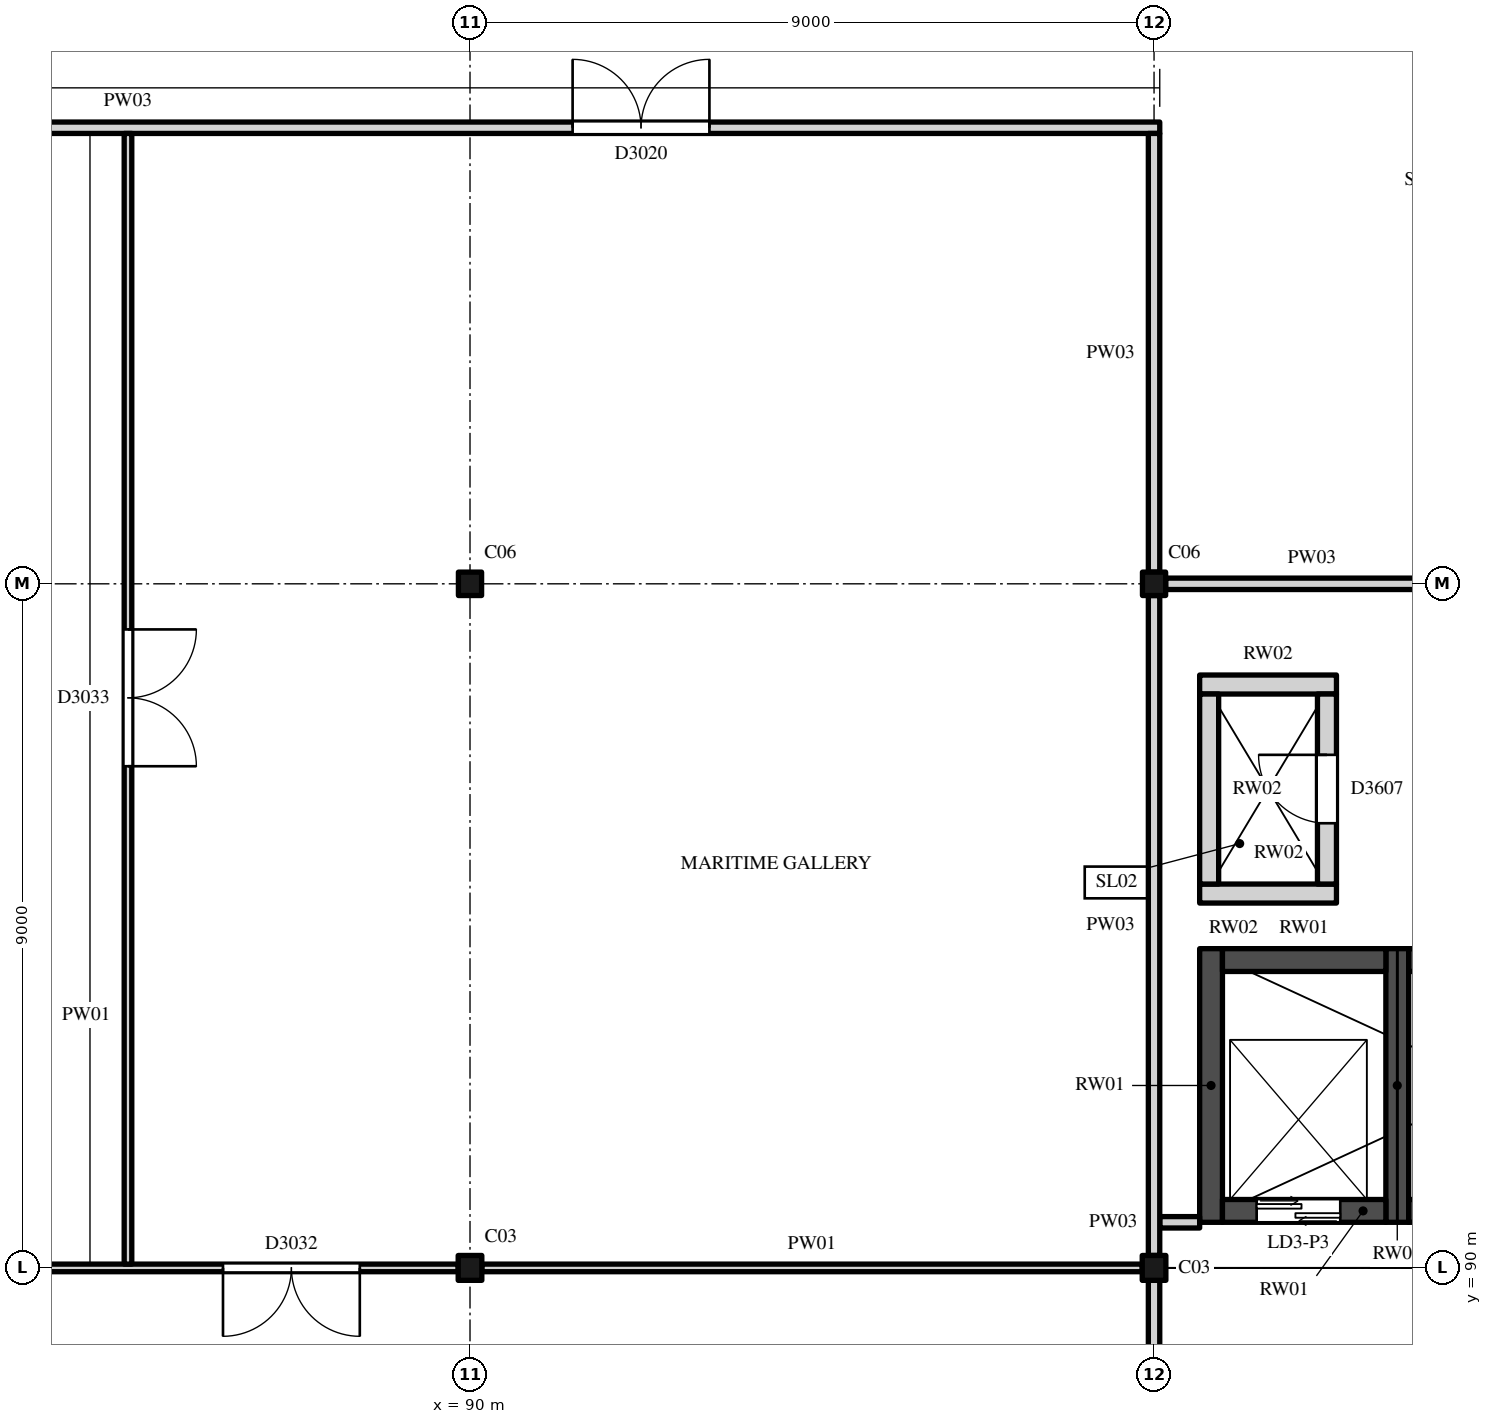
"""IFC4 building model, lengths in metres.
Left out: names, types, materials, properties, quantities, classifications, styles, units other than length and angle.
Written with IfcOpenShell. Run it as: python <this file> out.ifc"""

import sys

from ifc_helpers import new_model, si_unit, direction, frame, frame_2d, origin, origin_2d, place, context, subcontext, project, spatial, rectangle, i_section, extrude, element, fill, save


model = new_model("IFC4")
c1 = context("Model", 3, precision=1e-05, world=origin(), true_north=direction((0.0, 1.0)))
c2 = subcontext(c1, "Body", "Model", "MODEL_VIEW")
j1 = project(units=[si_unit("LENGTHUNIT", "METRE"), si_unit("PLANEANGLEUNIT", "RADIAN")], contexts=[c1])
p1 = place(None, origin())
s1 = spatial("IfcSite", under=j1, at=p1, CompositionType="ELEMENT")
p2 = place(p1, origin())
s2 = spatial("IfcBuilding", under=s1, at=p2, CompositionType="ELEMENT")
p3 = place(p2, frame((0.0, 0.0, 16.0)))
s3 = spatial("IfcBuildingStorey", under=s2, at=p3, CompositionType="ELEMENT", Elevation=16.0)
for number, where, z_axis, x_axis in (
    (1, (90.0, 90.0, 0.0), (0.0, 0.0, 1.0), (1.0, 0.0, 0.0)),
    (2, (99.0, 90.0, 0.0), (0.0, 0.0, 1.0), (1.0, 0.0, 0.0)),
):
    element("IfcColumn", number, at=place(p3, frame(where, z_axis=z_axis, x_axis=x_axis)), inside=s3, PredefinedType="COLUMN", context=c2, shape_type="SweptSolid", body=[
        extrude(i_section(OverallWidth=0.311, OverallDepth=0.327, WebThickness=0.016, FlangeThickness=0.025, FilletRadius=0.017, at=origin_2d()), origin(), (0.0, 0.0, 1.0), 10.0),
    ])
for number, where, z_axis, x_axis in (
    (3, (90.0, 99.0, 0.0), (0.0, 0.0, 1.0), (1.0, 0.0, 0.0)),
    (4, (99.0, 99.0, 0.0), (0.0, 0.0, 1.0), (1.0, 0.0, 0.0)),
):
    element("IfcColumn", number, at=place(p3, frame(where, z_axis=z_axis, x_axis=x_axis)), inside=s3, PredefinedType="COLUMN", context=c2, shape_type="SweptSolid", body=[
        extrude(i_section(OverallWidth=0.305, OverallDepth=0.308, WebThickness=0.01, FlangeThickness=0.015, FilletRadius=0.017, at=origin_2d()), origin(), (0.0, 0.0, 1.0), 10.0),
    ])
for number, where, z_axis, x_axis in (
    (5, (99.75, 90.6, 0.0), (0.0, 0.0, 1.0), (0.0, 1.0, 0.0)),
    (6, (102.2, 90.6, 0.0), (0.0, 0.0, 1.0), (0.0, 1.0, 0.0)),
):
    element("IfcWall", number, at=place(p3, frame(where, z_axis=z_axis, x_axis=x_axis)), inside=s3, PredefinedType="SHEAR", context=c2, shape_type="SweptSolid", body=[
        extrude(rectangle(XDim=3.6, YDim=0.3, at=frame_2d((1.8, 0.0))), origin(), (0.0, 0.0, 1.0), 10.0),
    ])
p4 = place(p3, frame((99.9, 90.75, 0.0), z_axis=(0.0, 0.0, 1.0), x_axis=(1.0, 0.0, 0.0)))
e7 = element("IfcWall", 7, at=p4, inside=s3, PredefinedType="SHEAR", context=c2, shape_type="SweptSolid", body=[
    extrude(rectangle(XDim=2.15, YDim=0.3, at=frame_2d((1.075, 0.0))), origin(), (0.0, 0.0, 1.0), 10.0),
])
p5 = place(p4, frame((0.45, 0.0, 0.0)))
e8 = element("IfcOpeningElement", 8, at=p5, cuts=e7, PredefinedType="OPENING", context=c2, shape_type="SweptSolid", body=[
    extrude(rectangle(XDim=1.1, YDim=2.1, at=frame_2d((0.55, 1.05))), frame((0.0, 0.16, 0.0), z_axis=(0.0, -1.0, 0.0), x_axis=(1.0, 0.0, 0.0)), (0.0, 0.0, 1.0), 0.32),
])
p6 = place(p3, frame((99.9, 94.05, 0.0), z_axis=(0.0, 0.0, 1.0), x_axis=(1.0, 0.0, 0.0)))
e9 = element("IfcWall", 9, at=p6, inside=s3, PredefinedType="SHEAR", context=c2, shape_type="SweptSolid", body=[
    extrude(rectangle(XDim=2.15, YDim=0.3, at=frame_2d((1.075, 0.0))), origin(), (0.0, 0.0, 1.0), 10.0),
])
p7 = place(p3, frame((102.35, 90.75, 0.0), z_axis=(0.0, 0.0, 1.0), x_axis=(1.0, 0.0, 0.0)))
e10 = element("IfcWall", 10, at=p7, inside=s3, PredefinedType="SHEAR", context=c2, shape_type="SweptSolid", body=[
    extrude(rectangle(XDim=2.3, YDim=0.3, at=frame_2d((1.15, 0.0))), origin(), (0.0, 0.0, 1.0), 10.0),
])
p8 = place(p7, frame((0.6, 0.0, 0.0)))
e11 = element("IfcOpeningElement", 11, at=p8, cuts=e10, PredefinedType="OPENING", context=c2, shape_type="SweptSolid", body=[
    extrude(rectangle(XDim=1.1, YDim=2.1, at=frame_2d((0.55, 1.05))), frame((0.0, 0.16, 0.0), z_axis=(0.0, -1.0, 0.0), x_axis=(1.0, 0.0, 0.0)), (0.0, 0.0, 1.0), 0.32),
])
p9 = place(p3, frame((102.35, 94.05, 0.0), z_axis=(0.0, 0.0, 1.0), x_axis=(1.0, 0.0, 0.0)))
e12 = element("IfcWall", 12, at=p9, inside=s3, PredefinedType="SHEAR", context=c2, shape_type="SweptSolid", body=[
    extrude(rectangle(XDim=2.3, YDim=0.3, at=frame_2d((1.15, 0.0))), origin(), (0.0, 0.0, 1.0), 10.0),
])
for number, where, z_axis, x_axis in (
    (13, (99.6, 94.925, 0.0), (0.0, 0.0, 1.0), (1.0, 0.0, 0.0)),
    (14, (99.6, 97.675, 0.0), (0.0, 0.0, 1.0), (1.0, 0.0, 0.0)),
):
    element("IfcWall", number, at=place(p3, frame(where, z_axis=z_axis, x_axis=x_axis)), inside=s3, PredefinedType="STANDARD", context=c2, shape_type="SweptSolid", body=[
        extrude(rectangle(XDim=1.8, YDim=0.25, at=frame_2d((0.9, 0.0))), origin(), (0.0, 0.0, 1.0), 10.0),
    ])
p10 = place(p3, frame((99.725, 95.05, 0.0), z_axis=(0.0, 0.0, 1.0), x_axis=(0.0, 1.0, 0.0)))
e15 = element("IfcWall", 15, at=p10, inside=s3, PredefinedType="STANDARD", context=c2, shape_type="SweptSolid", body=[
    extrude(rectangle(XDim=2.5, YDim=0.25, at=frame_2d((1.25, 0.0))), origin(), (0.0, 0.0, 1.0), 10.0),
])
p11 = place(p3, frame((101.275, 95.05, 0.0), z_axis=(0.0, 0.0, 1.0), x_axis=(0.0, 1.0, 0.0)))
e16 = element("IfcWall", 16, at=p11, inside=s3, PredefinedType="STANDARD", context=c2, shape_type="SweptSolid", body=[
    extrude(rectangle(XDim=2.5, YDim=0.25, at=frame_2d((1.25, 0.0))), origin(), (0.0, 0.0, 1.0), 10.0),
])
p12 = place(p11, frame((0.8, 0.0, 0.0)))
e17 = element("IfcOpeningElement", 17, at=p12, cuts=e16, PredefinedType="OPENING", context=c2, shape_type="SweptSolid", body=[
    extrude(rectangle(XDim=0.9, YDim=2.1, at=frame_2d((0.45, 1.05))), frame((0.0, 0.135, 0.0), z_axis=(0.0, -1.0, 0.0), x_axis=(1.0, 0.0, 0.0)), (0.0, 0.0, 1.0), 0.27),
])
p13 = place(p3, frame((81.156, 90.0, 0.0), z_axis=(0.0, 0.0, 1.0), x_axis=(1.0, 0.0, 0.0)))
e18 = element("IfcWall", 18, at=p13, inside=s3, PredefinedType="PARTITIONING", context=c2, shape_type="SweptSolid", body=[
    extrude(rectangle(XDim=8.689, YDim=0.1, at=frame_2d((4.344, 0.0))), origin(), (0.0, 0.0, 1.0), 9.473),
])
p14 = place(p13, frame((5.594, 0.0, 0.0)))
e19 = element("IfcOpeningElement", 19, at=p14, cuts=e18, PredefinedType="OPENING", context=c2, shape_type="SweptSolid", body=[
    extrude(rectangle(XDim=1.8, YDim=2.4, at=frame_2d((0.9, 1.2))), frame((0.0, 0.06, 0.0), z_axis=(0.0, -1.0, 0.0), x_axis=(1.0, 0.0, 0.0)), (0.0, 0.0, 1.0), 0.12),
])
p15 = place(p3, frame((90.156, 90.0, 0.0), z_axis=(0.0, 0.0, 1.0), x_axis=(1.0, 0.0, 0.0)))
e20 = element("IfcWall", 20, at=p15, inside=s3, PredefinedType="PARTITIONING", context=c2, shape_type="SweptSolid", body=[
    extrude(rectangle(XDim=8.689, YDim=0.1, at=frame_2d((4.344, 0.0))), origin(), (0.0, 0.0, 1.0), 9.473),
])
p16 = place(p3, frame((99.075, 90.6, 0.0), z_axis=(0.0, 0.0, 1.0), x_axis=(1.0, 0.0, 0.0)))
e21 = element("IfcWall", 21, at=p16, inside=s3, PredefinedType="PARTITIONING", context=c2, shape_type="SweptSolid", body=[
    extrude(rectangle(XDim=0.525, YDim=0.15, at=frame_2d((0.263, 0.0))), origin(), (0.0, 0.0, 1.0), 9.825),
])
p17 = place(p3, frame((99.153, 99.0, 0.0), z_axis=(0.0, 0.0, 1.0), x_axis=(1.0, 0.0, 0.0)))
e22 = element("IfcWall", 22, at=p17, inside=s3, PredefinedType="PARTITIONING", context=c2, shape_type="SweptSolid", body=[
    extrude(rectangle(XDim=8.695, YDim=0.15, at=frame_2d((4.347, 0.0))), origin(), (0.0, 0.0, 1.0), 9.473),
])
p18 = place(p17, frame((3.85, 0.0, 0.0)))
e23 = element("IfcOpeningElement", 23, at=p18, cuts=e22, PredefinedType="OPENING", context=c2, shape_type="SweptSolid", body=[
    extrude(rectangle(XDim=1.0, YDim=2.4, at=frame_2d((0.5, 1.2))), frame((0.0, 0.085, 0.0), z_axis=(0.0, -1.0, 0.0), x_axis=(1.0, 0.0, 0.0)), (0.0, 0.0, 1.0), 0.17),
])
p19 = place(p3, frame((71.925, 105.0, 0.0), z_axis=(0.0, 0.0, 1.0), x_axis=(1.0, 0.0, 0.0)))
e24 = element("IfcWall", 24, at=p19, inside=s3, PredefinedType="PARTITIONING", context=c2, shape_type="SweptSolid", body=[
    extrude(rectangle(XDim=27.15, YDim=0.15, at=frame_2d((13.575, 0.0))), origin(), (0.0, 0.0, 1.0), 9.521),
])
p20 = place(p19, frame((5.925, 0.0, 0.0)))
e25 = element("IfcOpeningElement", 25, at=p20, cuts=e24, PredefinedType="OPENING", context=c2, shape_type="SweptSolid", body=[
    extrude(rectangle(XDim=1.8, YDim=2.4, at=frame_2d((0.9, 1.2))), frame((0.0, 0.085, 0.0), z_axis=(0.0, -1.0, 0.0), x_axis=(1.0, 0.0, 0.0)), (0.0, 0.0, 1.0), 0.17),
])
p21 = place(p19, frame((19.425, 0.0, 0.0)))
e26 = element("IfcOpeningElement", 26, at=p21, cuts=e24, PredefinedType="OPENING", context=c2, shape_type="SweptSolid", body=[
    extrude(rectangle(XDim=1.8, YDim=2.4, at=frame_2d((0.9, 1.2))), frame((0.0, 0.085, 0.0), z_axis=(0.0, -1.0, 0.0), x_axis=(1.0, 0.0, 0.0)), (0.0, 0.0, 1.0), 0.17),
])
p22 = place(p3, frame((85.5, 90.05, 0.0), z_axis=(0.0, 0.0, 1.0), x_axis=(0.0, 1.0, 0.0)))
e27 = element("IfcWall", 27, at=p22, inside=s3, PredefinedType="PARTITIONING", context=c2, shape_type="SweptSolid", body=[
    extrude(rectangle(XDim=14.875, YDim=0.1, at=frame_2d((7.438, 0.0))), origin(), (0.0, 0.0, 1.0), 9.825),
])
p23 = place(p22, frame((6.55, 0.0, 0.0)))
e28 = element("IfcOpeningElement", 28, at=p23, cuts=e27, PredefinedType="OPENING", context=c2, shape_type="SweptSolid", body=[
    extrude(rectangle(XDim=1.8, YDim=2.4, at=frame_2d((0.9, 1.2))), frame((0.0, 0.06, 0.0), z_axis=(0.0, -1.0, 0.0), x_axis=(1.0, 0.0, 0.0)), (0.0, 0.0, 1.0), 0.12),
])
p24 = place(p3, frame((99.0, 84.075, 0.0), z_axis=(0.0, 0.0, 1.0), x_axis=(0.0, 1.0, 0.0)))
e29 = element("IfcWall", 29, at=p24, inside=s3, PredefinedType="PARTITIONING", context=c2, shape_type="SweptSolid", body=[
    extrude(rectangle(XDim=5.761, YDim=0.15, at=frame_2d((2.881, 0.0))), origin(), (0.0, 0.0, 1.0), 9.371),
])
p25 = place(p3, frame((99.0, 90.164, 0.0), z_axis=(0.0, 0.0, 1.0), x_axis=(0.0, 1.0, 0.0)))
e30 = element("IfcWall", 30, at=p25, inside=s3, PredefinedType="PARTITIONING", context=c2, shape_type="SweptSolid", body=[
    extrude(rectangle(XDim=8.682, YDim=0.15, at=frame_2d((4.341, 0.0))), origin(), (0.0, 0.0, 1.0), 9.371),
])
p26 = place(p3, frame((99.0, 99.154, 0.0), z_axis=(0.0, 0.0, 1.0), x_axis=(0.0, 1.0, 0.0)))
e31 = element("IfcWall", 31, at=p26, inside=s3, PredefinedType="PARTITIONING", context=c2, shape_type="SweptSolid", body=[
    extrude(rectangle(XDim=5.771, YDim=0.15, at=frame_2d((2.885, 0.0))), origin(), (0.0, 0.0, 1.0), 9.371),
])
p27 = place(p5, origin())
e32 = element("IfcDoor", 32, at=p27, inside=s3, OperationType="DOUBLE_DOOR_SLIDING", PredefinedType="DOOR", context=c2, shape_type="SweptSolid", body=[
    extrude(rectangle(XDim=1.1, YDim=2.1, at=frame_2d((0.55, 1.05))), frame((0.0, 0.025, 0.0), z_axis=(0.0, -1.0, 0.0), x_axis=(1.0, 0.0, 0.0)), (0.0, 0.0, 1.0), 0.05),
])
fill(e8, e32)
p28 = place(p12, origin())
e33 = element("IfcDoor", 33, at=p28, inside=s3, OperationType="SINGLE_SWING_LEFT", PredefinedType="DOOR", context=c2, shape_type="SweptSolid", body=[
    extrude(rectangle(XDim=0.9, YDim=2.1, at=frame_2d((0.45, 1.05))), frame((0.0, 0.025, 0.0), z_axis=(0.0, -1.0, 0.0), x_axis=(1.0, 0.0, 0.0)), (0.0, 0.0, 1.0), 0.05),
])
fill(e17, e33)
p29 = place(p21, origin())
e34 = element("IfcDoor", 34, at=p29, inside=s3, OperationType="DOUBLE_DOOR_SINGLE_SWING", PredefinedType="DOOR", context=c2, shape_type="SweptSolid", body=[
    extrude(rectangle(XDim=1.8, YDim=2.4, at=frame_2d((0.9, 1.2))), frame((0.0, 0.025, 0.0), z_axis=(0.0, -1.0, 0.0), x_axis=(1.0, 0.0, 0.0)), (0.0, 0.0, 1.0), 0.05),
])
fill(e26, e34)
p30 = place(p14, origin())
e35 = element("IfcDoor", 35, at=p30, inside=s3, OperationType="DOUBLE_DOOR_SINGLE_SWING", PredefinedType="DOOR", context=c2, shape_type="SweptSolid", body=[
    extrude(rectangle(XDim=1.8, YDim=2.4, at=frame_2d((0.9, 1.2))), frame((0.0, 0.025, 0.0), z_axis=(0.0, -1.0, 0.0), x_axis=(1.0, 0.0, 0.0)), (0.0, 0.0, 1.0), 0.05),
])
fill(e19, e35)
p31 = place(p23, origin())
e36 = element("IfcDoor", 36, at=p31, inside=s3, OperationType="DOUBLE_DOOR_SINGLE_SWING", PredefinedType="DOOR", context=c2, shape_type="SweptSolid", body=[
    extrude(rectangle(XDim=1.8, YDim=2.4, at=frame_2d((0.9, 1.2))), frame((0.0, 0.025, 0.0), z_axis=(0.0, -1.0, 0.0), x_axis=(1.0, 0.0, 0.0)), (0.0, 0.0, 1.0), 0.05),
])
fill(e28, e36)
save(model, sys.argv[1])
